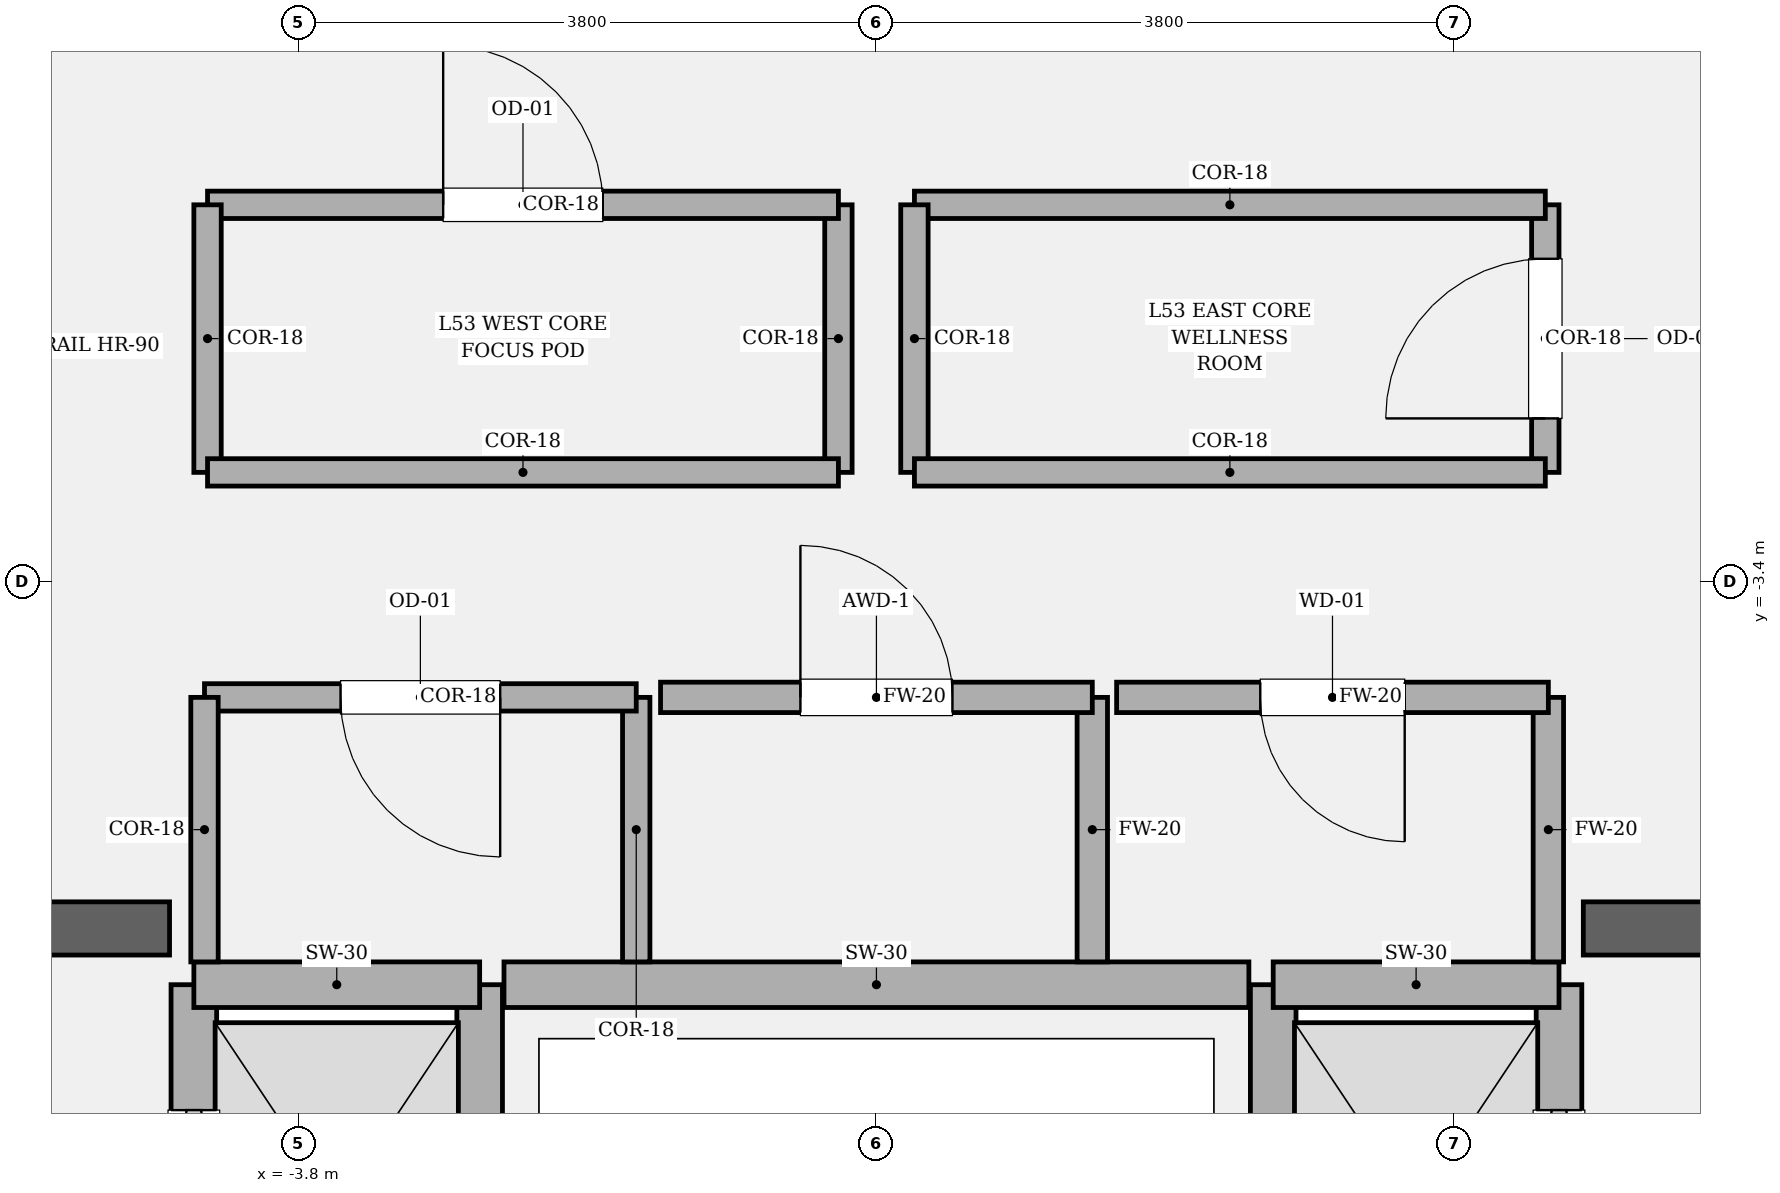
"""IFC4 building model, lengths in metres.
Left out: names, types, materials, properties, quantities, classifications, styles, units other than length and angle.
Written with IfcOpenShell. Run it as: python <this file> out.ifc"""

import sys

from ifc_helpers import new_model, si_unit, direction, frame, frame_2d, origin, place, context, subcontext, project, spatial, rectangle, extrude, element, fill, save


model = new_model("IFC4")
c1 = context("Model", 3, precision=1e-05, world=origin(), true_north=direction((0.0, 1.0)))
c2 = subcontext(c1, "Body", "Model", "MODEL_VIEW")
j1 = project(units=[si_unit("LENGTHUNIT", "METRE"), si_unit("PLANEANGLEUNIT", "RADIAN")], contexts=[c1])
p1 = place(None, origin())
s1 = spatial("IfcSite", under=j1, at=p1, CompositionType="ELEMENT")
p2 = place(p1, origin())
s2 = spatial("IfcBuilding", under=s1, at=p2, CompositionType="ELEMENT")
p3 = place(p2, frame((0.0, 0.0, 224.85)))
s3 = spatial("IfcBuildingStorey", under=s2, at=p3, CompositionType="ELEMENT", Elevation=224.85)
p4 = place(p3, frame((-9.875, -5.68, 0.0), z_axis=(0.0, 0.0, 1.0), x_axis=(1.0, 0.0, 0.0)))
e1 = element("IfcWall", 1, at=p4, inside=s3, PredefinedType="SOLIDWALL", context=c2, shape_type="SweptSolid", body=[
    extrude(rectangle(XDim=5.225, YDim=0.35, at=frame_2d((2.613, 0.0))), origin(), (0.0, 0.0, 1.0), 4.05),
])
p5 = place(p4, frame((1.335, 0.0, 0.0)))
e2 = element("IfcOpeningElement", 2, at=p5, cuts=e1, PredefinedType="OPENING", context=c2, shape_type="SweptSolid", body=[
    extrude(rectangle(XDim=1.18, YDim=2.2, at=frame_2d((0.59, 1.1))), frame((0.0, 0.185, 0.0), z_axis=(0.0, -1.0, 0.0), x_axis=(1.0, 0.0, 0.0)), (0.0, 0.0, 1.0), 0.37),
])
p6 = place(p3, frame((4.65, -5.68, 0.0), z_axis=(0.0, 0.0, 1.0), x_axis=(1.0, 0.0, 0.0)))
e3 = element("IfcWall", 3, at=p6, inside=s3, PredefinedType="SOLIDWALL", context=c2, shape_type="SweptSolid", body=[
    extrude(rectangle(XDim=5.225, YDim=0.35, at=frame_2d((2.613, 0.0))), origin(), (0.0, 0.0, 1.0), 4.05),
])
p7 = place(p6, frame((2.71, 0.0, 0.0)))
e4 = element("IfcOpeningElement", 4, at=p7, cuts=e3, PredefinedType="OPENING", context=c2, shape_type="SweptSolid", body=[
    extrude(rectangle(XDim=1.18, YDim=2.2, at=frame_2d((0.59, 1.1))), frame((0.0, 0.185, 0.0), z_axis=(0.0, -1.0, 0.0), x_axis=(1.0, 0.0, 0.0)), (0.0, 0.0, 1.0), 0.37),
])
p8 = place(p3, frame((-4.49, -8.82, 0.0), z_axis=(0.0, 0.0, 1.0), x_axis=(0.0, 1.0, 0.0)))
e5 = element("IfcWall", 5, at=p8, inside=s3, PredefinedType="SOLIDWALL", context=c2, shape_type="SweptSolid", body=[
    extrude(rectangle(XDim=2.77, YDim=0.3, at=frame_2d((1.385, 0.0))), origin(), (0.0, 0.0, 1.0), 3.83),
])
p9 = place(p8, frame((0.825, 0.0, 0.0)))
e6 = element("IfcOpeningElement", 6, at=p9, cuts=e5, PredefinedType="OPENING", context=c2, shape_type="SweptSolid", body=[
    extrude(rectangle(XDim=1.12, YDim=2.25, at=frame_2d((0.56, 1.125))), frame((0.0, 0.16, 0.0), z_axis=(0.0, -1.0, 0.0), x_axis=(1.0, 0.0, 0.0)), (0.0, 0.0, 1.0), 0.32),
])
p10 = place(p3, frame((-2.61, -8.82, 0.0), z_axis=(0.0, 0.0, 1.0), x_axis=(0.0, 1.0, 0.0)))
e7 = element("IfcWall", 7, at=p10, inside=s3, PredefinedType="SOLIDWALL", context=c2, shape_type="SweptSolid", body=[
    extrude(rectangle(XDim=2.77, YDim=0.3, at=frame_2d((1.385, 0.0))), origin(), (0.0, 0.0, 1.0), 3.83),
])
p11 = place(p3, frame((-4.49, -6.05, 0.0), z_axis=(0.0, 0.0, 1.0), x_axis=(1.0, 0.0, 0.0)))
e8 = element("IfcWall", 8, at=p11, inside=s3, PredefinedType="SOLIDWALL", context=c2, shape_type="SweptSolid", body=[
    extrude(rectangle(XDim=1.88, YDim=0.3, at=frame_2d((0.94, 0.0))), origin(), (0.0, 0.0, 1.0), 3.83),
])
p12 = place(p3, frame((4.49, -8.82, 0.0), z_axis=(0.0, 0.0, 1.0), x_axis=(0.0, 1.0, 0.0)))
e9 = element("IfcWall", 9, at=p12, inside=s3, PredefinedType="SOLIDWALL", context=c2, shape_type="SweptSolid", body=[
    extrude(rectangle(XDim=2.77, YDim=0.3, at=frame_2d((1.385, 0.0))), origin(), (0.0, 0.0, 1.0), 3.83),
])
p13 = place(p12, frame((0.825, 0.0, 0.0)))
e10 = element("IfcOpeningElement", 10, at=p13, cuts=e9, PredefinedType="OPENING", context=c2, shape_type="SweptSolid", body=[
    extrude(rectangle(XDim=1.12, YDim=2.25, at=frame_2d((0.56, 1.125))), frame((0.0, 0.16, 0.0), z_axis=(0.0, -1.0, 0.0), x_axis=(1.0, 0.0, 0.0)), (0.0, 0.0, 1.0), 0.32),
])
p14 = place(p3, frame((2.61, -8.82, 0.0), z_axis=(0.0, 0.0, 1.0), x_axis=(0.0, 1.0, 0.0)))
e11 = element("IfcWall", 11, at=p14, inside=s3, PredefinedType="SOLIDWALL", context=c2, shape_type="SweptSolid", body=[
    extrude(rectangle(XDim=2.77, YDim=0.3, at=frame_2d((1.385, 0.0))), origin(), (0.0, 0.0, 1.0), 3.83),
])
p15 = place(p3, frame((2.61, -6.05, 0.0), z_axis=(0.0, 0.0, 1.0), x_axis=(1.0, 0.0, 0.0)))
e12 = element("IfcWall", 12, at=p15, inside=s3, PredefinedType="SOLIDWALL", context=c2, shape_type="SweptSolid", body=[
    extrude(rectangle(XDim=1.88, YDim=0.3, at=frame_2d((0.94, 0.0))), origin(), (0.0, 0.0, 1.0), 3.83),
])
p16 = place(p3, frame((-2.45, -6.05, 0.0), z_axis=(0.0, 0.0, 1.0), x_axis=(1.0, 0.0, 0.0)))
e13 = element("IfcWall", 13, at=p16, inside=s3, PredefinedType="SOLIDWALL", context=c2, shape_type="SweptSolid", body=[
    extrude(rectangle(XDim=4.9, YDim=0.3, at=frame_2d((2.45, 0.0))), origin(), (0.0, 0.0, 1.0), 3.83),
])
p17 = place(p3, frame((-1.58, -5.9, 0.0), z_axis=(0.0, 0.0, 1.0), x_axis=(0.0, 1.0, 0.0)))
e14 = element("IfcWall", 14, at=p17, inside=s3, PredefinedType="PARTITIONING", context=c2, shape_type="SweptSolid", body=[
    extrude(rectangle(XDim=1.74, YDim=0.18, at=frame_2d((0.87, 0.0))), origin(), (0.0, 0.0, 1.0), 3.83),
])
p18 = place(p3, frame((-1.58, -4.16, 0.0), z_axis=(0.0, 0.0, 1.0), x_axis=(-1.0, 0.0, 0.0)))
e15 = element("IfcWall", 15, at=p18, inside=s3, PredefinedType="PARTITIONING", context=c2, shape_type="SweptSolid", body=[
    extrude(rectangle(XDim=2.84, YDim=0.18, at=frame_2d((1.42, 0.0))), origin(), (0.0, 0.0, 1.0), 3.83),
])
p19 = place(p18, frame((0.895, 0.0, 0.0)))
e16 = element("IfcOpeningElement", 16, at=p19, cuts=e15, PredefinedType="OPENING", context=c2, shape_type="SweptSolid", body=[
    extrude(rectangle(XDim=1.05, YDim=2.2, at=frame_2d((0.525, 1.1))), frame((0.0, 0.1, 0.0), z_axis=(0.0, -1.0, 0.0), x_axis=(1.0, 0.0, 0.0)), (0.0, 0.0, 1.0), 0.2),
])
p20 = place(p3, frame((-4.42, -4.16, 0.0), z_axis=(0.0, 0.0, 1.0), x_axis=(0.0, -1.0, 0.0)))
e17 = element("IfcWall", 17, at=p20, inside=s3, PredefinedType="PARTITIONING", context=c2, shape_type="SweptSolid", body=[
    extrude(rectangle(XDim=1.74, YDim=0.18, at=frame_2d((0.87, 0.0))), origin(), (0.0, 0.0, 1.0), 3.83),
])
p21 = place(p3, frame((1.42, -5.9, 0.0), z_axis=(0.0, 0.0, 1.0), x_axis=(0.0, 1.0, 0.0)))
e18 = element("IfcWall", 18, at=p21, inside=s3, PredefinedType="SOLIDWALL", context=c2, shape_type="SweptSolid", body=[
    extrude(rectangle(XDim=1.74, YDim=0.2, at=frame_2d((0.87, 0.0))), origin(), (0.0, 0.0, 1.0), 3.83),
])
p22 = place(p3, frame((1.42, -4.16, 0.0), z_axis=(0.0, 0.0, 1.0), x_axis=(-1.0, 0.0, 0.0)))
e19 = element("IfcWall", 19, at=p22, inside=s3, PredefinedType="SOLIDWALL", context=c2, shape_type="SweptSolid", body=[
    extrude(rectangle(XDim=2.84, YDim=0.2, at=frame_2d((1.42, 0.0))), origin(), (0.0, 0.0, 1.0), 3.83),
])
p23 = place(p22, frame((0.92, 0.0, 0.0)))
e20 = element("IfcOpeningElement", 20, at=p23, cuts=e19, PredefinedType="OPENING", context=c2, shape_type="SweptSolid", body=[
    extrude(rectangle(XDim=1.0, YDim=2.15, at=frame_2d((0.5, 1.075))), frame((0.0, 0.11, 0.0), z_axis=(0.0, -1.0, 0.0), x_axis=(1.0, 0.0, 0.0)), (0.0, 0.0, 1.0), 0.22),
])
p24 = place(p3, frame((4.42, -5.9, 0.0), z_axis=(0.0, 0.0, 1.0), x_axis=(0.0, 1.0, 0.0)))
e21 = element("IfcWall", 21, at=p24, inside=s3, PredefinedType="SOLIDWALL", context=c2, shape_type="SweptSolid", body=[
    extrude(rectangle(XDim=1.74, YDim=0.2, at=frame_2d((0.87, 0.0))), origin(), (0.0, 0.0, 1.0), 3.83),
])
p25 = place(p3, frame((4.42, -4.16, 0.0), z_axis=(0.0, 0.0, 1.0), x_axis=(-1.0, 0.0, 0.0)))
e22 = element("IfcWall", 22, at=p25, inside=s3, PredefinedType="SOLIDWALL", context=c2, shape_type="SweptSolid", body=[
    extrude(rectangle(XDim=2.84, YDim=0.2, at=frame_2d((1.42, 0.0))), origin(), (0.0, 0.0, 1.0), 3.83),
])
p26 = place(p25, frame((0.945, 0.0, 0.0)))
e23 = element("IfcOpeningElement", 23, at=p26, cuts=e22, PredefinedType="OPENING", context=c2, shape_type="SweptSolid", body=[
    extrude(rectangle(XDim=0.95, YDim=2.15, at=frame_2d((0.475, 1.075))), frame((0.0, 0.11, 0.0), z_axis=(0.0, -1.0, 0.0), x_axis=(1.0, 0.0, 0.0)), (0.0, 0.0, 1.0), 0.22),
])
p27 = place(p3, frame((-0.25, -2.68, 0.0), z_axis=(0.0, 0.0, 1.0), x_axis=(0.0, 1.0, 0.0)))
e24 = element("IfcWall", 24, at=p27, inside=s3, PredefinedType="PARTITIONING", context=c2, shape_type="SweptSolid", body=[
    extrude(rectangle(XDim=1.76, YDim=0.18, at=frame_2d((0.88, 0.0))), origin(), (0.0, 0.0, 1.0), 3.83),
])
p28 = place(p3, frame((-0.25, -0.92, 0.0), z_axis=(0.0, 0.0, 1.0), x_axis=(-1.0, 0.0, 0.0)))
e25 = element("IfcWall", 25, at=p28, inside=s3, PredefinedType="PARTITIONING", context=c2, shape_type="SweptSolid", body=[
    extrude(rectangle(XDim=4.15, YDim=0.18, at=frame_2d((2.075, 0.0))), origin(), (0.0, 0.0, 1.0), 3.83),
])
p29 = place(p28, frame((1.55, 0.0, 0.0)))
e26 = element("IfcOpeningElement", 26, at=p29, cuts=e25, PredefinedType="OPENING", context=c2, shape_type="SweptSolid", body=[
    extrude(rectangle(XDim=1.05, YDim=2.2, at=frame_2d((0.525, 1.1))), frame((0.0, 0.1, 0.0), z_axis=(0.0, -1.0, 0.0), x_axis=(1.0, 0.0, 0.0)), (0.0, 0.0, 1.0), 0.2),
])
p30 = place(p3, frame((-4.4, -0.92, 0.0), z_axis=(0.0, 0.0, 1.0), x_axis=(0.0, -1.0, 0.0)))
e27 = element("IfcWall", 27, at=p30, inside=s3, PredefinedType="PARTITIONING", context=c2, shape_type="SweptSolid", body=[
    extrude(rectangle(XDim=1.76, YDim=0.18, at=frame_2d((0.88, 0.0))), origin(), (0.0, 0.0, 1.0), 3.83),
])
p31 = place(p3, frame((-4.4, -2.68, 0.0), z_axis=(0.0, 0.0, 1.0), x_axis=(1.0, 0.0, 0.0)))
e28 = element("IfcWall", 28, at=p31, inside=s3, PredefinedType="PARTITIONING", context=c2, shape_type="SweptSolid", body=[
    extrude(rectangle(XDim=4.15, YDim=0.18, at=frame_2d((2.075, 0.0))), origin(), (0.0, 0.0, 1.0), 3.83),
])
p32 = place(p3, frame((4.4, -2.68, 0.0), z_axis=(0.0, 0.0, 1.0), x_axis=(0.0, 1.0, 0.0)))
e29 = element("IfcWall", 29, at=p32, inside=s3, PredefinedType="PARTITIONING", context=c2, shape_type="SweptSolid", body=[
    extrude(rectangle(XDim=1.76, YDim=0.18, at=frame_2d((0.88, 0.0))), origin(), (0.0, 0.0, 1.0), 3.83),
])
p33 = place(p32, frame((0.355, 0.0, 0.0)))
e30 = element("IfcOpeningElement", 30, at=p33, cuts=e29, PredefinedType="OPENING", context=c2, shape_type="SweptSolid", body=[
    extrude(rectangle(XDim=1.05, YDim=2.2, at=frame_2d((0.525, 1.1))), frame((0.0, 0.1, 0.0), z_axis=(0.0, -1.0, 0.0), x_axis=(1.0, 0.0, 0.0)), (0.0, 0.0, 1.0), 0.2),
])
p34 = place(p3, frame((4.4, -0.92, 0.0), z_axis=(0.0, 0.0, 1.0), x_axis=(-1.0, 0.0, 0.0)))
e31 = element("IfcWall", 31, at=p34, inside=s3, PredefinedType="PARTITIONING", context=c2, shape_type="SweptSolid", body=[
    extrude(rectangle(XDim=4.15, YDim=0.18, at=frame_2d((2.075, 0.0))), origin(), (0.0, 0.0, 1.0), 3.83),
])
p35 = place(p3, frame((0.25, -0.92, 0.0), z_axis=(0.0, 0.0, 1.0), x_axis=(0.0, -1.0, 0.0)))
e32 = element("IfcWall", 32, at=p35, inside=s3, PredefinedType="PARTITIONING", context=c2, shape_type="SweptSolid", body=[
    extrude(rectangle(XDim=1.76, YDim=0.18, at=frame_2d((0.88, 0.0))), origin(), (0.0, 0.0, 1.0), 3.83),
])
p36 = place(p3, frame((0.25, -2.68, 0.0), z_axis=(0.0, 0.0, 1.0), x_axis=(1.0, 0.0, 0.0)))
e33 = element("IfcWall", 33, at=p36, inside=s3, PredefinedType="PARTITIONING", context=c2, shape_type="SweptSolid", body=[
    extrude(rectangle(XDim=4.15, YDim=0.18, at=frame_2d((2.075, 0.0))), origin(), (0.0, 0.0, 1.0), 3.83),
])
p37 = place(p9, origin())
e34 = element("IfcDoor", 34, at=p37, inside=s3, OperationType="SLIDING_TO_LEFT", PredefinedType="DOOR", context=c2, shape_type="SweptSolid", body=[
    extrude(rectangle(XDim=1.12, YDim=2.25, at=frame_2d((0.56, 1.125))), frame((0.0, 0.025, 0.0), z_axis=(0.0, -1.0, 0.0), x_axis=(1.0, 0.0, 0.0)), (0.0, 0.0, 1.0), 0.05),
])
fill(e6, e34)
p38 = place(p13, origin())
e35 = element("IfcDoor", 35, at=p38, inside=s3, OperationType="SLIDING_TO_RIGHT", PredefinedType="DOOR", context=c2, shape_type="SweptSolid", body=[
    extrude(rectangle(XDim=1.12, YDim=2.25, at=frame_2d((0.56, 1.125))), frame((0.0, 0.025, 0.0), z_axis=(0.0, -1.0, 0.0), x_axis=(1.0, 0.0, 0.0)), (0.0, 0.0, 1.0), 0.05),
])
fill(e10, e35)
p39 = place(p19, origin())
e36 = element("IfcDoor", 36, at=p39, inside=s3, OperationType="SINGLE_SWING_LEFT", PredefinedType="DOOR", context=c2, shape_type="SweptSolid", body=[
    extrude(rectangle(XDim=1.05, YDim=2.2, at=frame_2d((0.525, 1.1))), frame((0.0, 0.025, 0.0), z_axis=(0.0, -1.0, 0.0), x_axis=(1.0, 0.0, 0.0)), (0.0, 0.0, 1.0), 0.05),
])
fill(e16, e36)
p40 = place(p23, origin())
e37 = element("IfcDoor", 37, at=p40, inside=s3, OperationType="SINGLE_SWING_RIGHT", PredefinedType="DOOR", context=c2, shape_type="SweptSolid", body=[
    extrude(rectangle(XDim=1.0, YDim=2.15, at=frame_2d((0.5, 1.075))), frame((0.0, 0.025, 0.0), z_axis=(0.0, -1.0, 0.0), x_axis=(1.0, 0.0, 0.0)), (0.0, 0.0, 1.0), 0.05),
])
fill(e20, e37)
p41 = place(p26, origin())
e38 = element("IfcDoor", 38, at=p41, inside=s3, OperationType="SINGLE_SWING_LEFT", PredefinedType="DOOR", context=c2, shape_type="SweptSolid", body=[
    extrude(rectangle(XDim=0.95, YDim=2.15, at=frame_2d((0.475, 1.075))), frame((0.0, 0.025, 0.0), z_axis=(0.0, -1.0, 0.0), x_axis=(1.0, 0.0, 0.0)), (0.0, 0.0, 1.0), 0.05),
])
fill(e23, e38)
p42 = place(p29, origin())
e39 = element("IfcDoor", 39, at=p42, inside=s3, OperationType="SINGLE_SWING_RIGHT", PredefinedType="DOOR", context=c2, shape_type="SweptSolid", body=[
    extrude(rectangle(XDim=1.05, YDim=2.2, at=frame_2d((0.525, 1.1))), frame((0.0, 0.025, 0.0), z_axis=(0.0, -1.0, 0.0), x_axis=(1.0, 0.0, 0.0)), (0.0, 0.0, 1.0), 0.05),
])
fill(e26, e39)
p43 = place(p33, origin())
e40 = element("IfcDoor", 40, at=p43, inside=s3, OperationType="SINGLE_SWING_LEFT", PredefinedType="DOOR", context=c2, shape_type="SweptSolid", body=[
    extrude(rectangle(XDim=1.05, YDim=2.2, at=frame_2d((0.525, 1.1))), frame((0.0, 0.025, 0.0), z_axis=(0.0, -1.0, 0.0), x_axis=(1.0, 0.0, 0.0)), (0.0, 0.0, 1.0), 0.05),
])
fill(e30, e40)
save(model, sys.argv[1])
